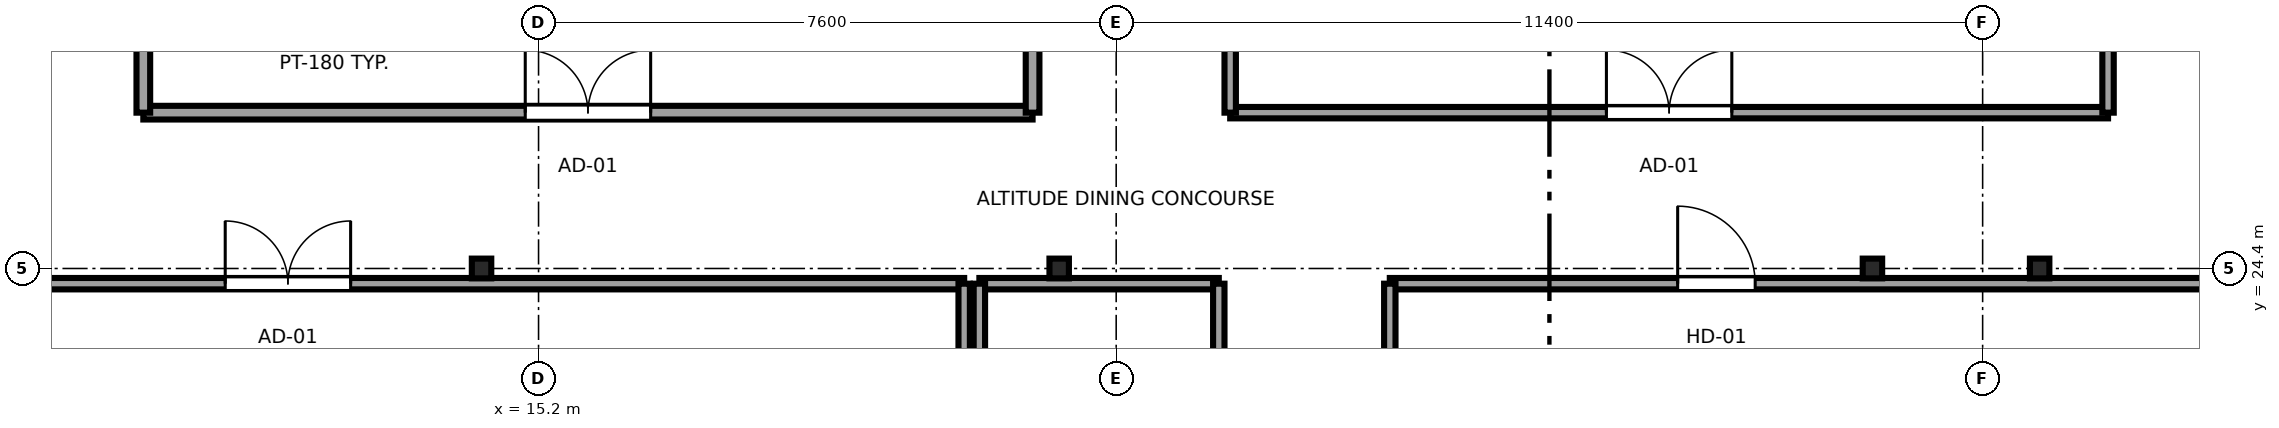
"""IFC4 building model, lengths in metres.
Left out: names, types, materials, properties, quantities, classifications, styles, units other than length and angle.
Written with IfcOpenShell. Run it as: python <this file> out.ifc"""

import sys

from ifc_helpers import new_model, si_unit, direction, frame, frame_2d, origin, origin_2d, place, context, subcontext, project, spatial, rectangle, i_section, extrude, source, transform, mapped, element, fill, save


model = new_model("IFC4")
c1 = context("Model", 3, precision=1e-05, world=origin(), true_north=direction((0.0, 1.0)))
c2 = subcontext(c1, "Body", "Model", "MODEL_VIEW")
j1 = project(units=[si_unit("LENGTHUNIT", "METRE"), si_unit("PLANEANGLEUNIT", "RADIAN")], contexts=[c1])
p1 = place(None, origin())
s1 = spatial("IfcSite", under=j1, at=p1, CompositionType="ELEMENT")
p2 = place(p1, origin())
s2 = spatial("IfcBuilding", under=s1, at=p2, CompositionType="ELEMENT")
p3 = place(p2, frame((0.0, 0.0, 286.55)))
s3 = spatial("IfcBuildingStorey", under=s2, at=p3, CompositionType="ELEMENT", Elevation=286.55)
m1 = source(origin(), c2, "Body", "SweptSolid", [
    extrude(i_section(OverallWidth=0.256, OverallDepth=0.26, WebThickness=0.01, FlangeThickness=0.017, FilletRadius=0.014, at=origin_2d()), origin(), (0.0, 0.0, 1.0), 4.4),
])
for number, where, z_axis, x_axis in (
    (1, (14.45, 24.4, 0.0), (0.0, 0.0, 1.0), (1.0, 0.0, 0.0)),
    (2, (22.05, 24.4, 0.0), (0.0, 0.0, 1.0), (1.0, 0.0, 0.0)),
    (3, (32.75, 24.4, 0.0), (0.0, 0.0, 1.0), (1.0, 0.0, 0.0)),
    (4, (34.95, 24.4, 0.0), (0.0, 0.0, 1.0), (1.0, 0.0, 0.0)),
):
    element("IfcColumn", number, at=place(p3, frame(where, z_axis=z_axis, x_axis=x_axis)), inside=s3, PredefinedType="COLUMN", context=c2, shape_type="MappedRepresentation", body=[
        mapped(m1, transform((0.0, 0.0, 0.0), x_axis=(1.0, 0.0, 0.0), y_axis=(0.0, 1.0, 0.0), z_axis=(0.0, 0.0, 1.0), scale=1.0)),
    ])
p4 = place(p3, frame((10.0, 26.45, 0.0), z_axis=(0.0, 0.0, 1.0), x_axis=(1.0, 0.0, 0.0)))
e5 = element("IfcWall", 5, at=p4, inside=s3, PredefinedType="PARTITIONING", context=c2, shape_type="SweptSolid", body=[
    extrude(rectangle(XDim=11.7, YDim=0.18, at=frame_2d((5.85, 0.0))), origin(), (0.0, 0.0, 1.0), 4.14),
])
p5 = place(p4, frame((5.025, 0.0, 0.0)))
e6 = element("IfcOpeningElement", 6, at=p5, cuts=e5, PredefinedType="OPENING", context=c2, shape_type="SweptSolid", body=[
    extrude(rectangle(XDim=1.65, YDim=2.15, at=frame_2d((0.825, 1.075))), frame((0.0, 0.1, 0.0), z_axis=(0.0, -1.0, 0.0), x_axis=(1.0, 0.0, 0.0)), (0.0, 0.0, 1.0), 0.2),
])
for number, where, z_axis, x_axis in (
    (7, (10.0, 26.45, 0.0), (0.0, 0.0, 1.0), (0.0, 1.0, 0.0)),
    (8, (21.7, 26.45, 0.0), (0.0, 0.0, 1.0), (0.0, 1.0, 0.0)),
):
    element("IfcWall", number, at=place(p3, frame(where, z_axis=z_axis, x_axis=x_axis)), inside=s3, PredefinedType="PARTITIONING", context=c2, shape_type="SweptSolid", body=[
        extrude(rectangle(XDim=2.7, YDim=0.18, at=frame_2d((1.35, 0.0))), origin(), (0.0, 0.0, 1.0), 4.14),
    ])
p6 = place(p3, frame((24.3, 26.45, 0.0), z_axis=(0.0, 0.0, 1.0), x_axis=(1.0, 0.0, 0.0)))
e9 = element("IfcWall", 9, at=p6, inside=s3, PredefinedType="PARTITIONING", context=c2, shape_type="SweptSolid", body=[
    extrude(rectangle(XDim=11.55, YDim=0.15, at=frame_2d((5.775, 0.0))), origin(), (0.0, 0.0, 1.0), 4.14),
])
p7 = place(p6, frame((4.95, 0.0, 0.0)))
e10 = element("IfcOpeningElement", 10, at=p7, cuts=e9, PredefinedType="OPENING", context=c2, shape_type="SweptSolid", body=[
    extrude(rectangle(XDim=1.65, YDim=2.15, at=frame_2d((0.825, 1.075))), frame((0.0, 0.085, 0.0), z_axis=(0.0, -1.0, 0.0), x_axis=(1.0, 0.0, 0.0)), (0.0, 0.0, 1.0), 0.17),
])
for number, where, z_axis, x_axis in (
    (11, (24.3, 26.45, 0.0), (0.0, 0.0, 1.0), (0.0, 1.0, 0.0)),
    (12, (35.85, 26.45, 0.0), (0.0, 0.0, 1.0), (0.0, 1.0, 0.0)),
):
    element("IfcWall", number, at=place(p3, frame(where, z_axis=z_axis, x_axis=x_axis)), inside=s3, PredefinedType="PARTITIONING", context=c2, shape_type="SweptSolid", body=[
        extrude(rectangle(XDim=2.7, YDim=0.15, at=frame_2d((1.35, 0.0))), origin(), (0.0, 0.0, 1.0), 4.14),
    ])
p8 = place(p3, frame((3.005, 24.2, 0.0), z_axis=(0.0, 0.0, 1.0), x_axis=(1.0, 0.0, 0.0)))
e13 = element("IfcWall", 13, at=p8, inside=s3, PredefinedType="PARTITIONING", context=c2, shape_type="SweptSolid", body=[
    extrude(rectangle(XDim=17.795, YDim=0.15, at=frame_2d((8.897, 0.0))), origin(), (0.0, 0.0, 1.0), 2.93),
])
p9 = place(p8, frame((8.073, 0.0, 0.0)))
e14 = element("IfcOpeningElement", 14, at=p9, cuts=e13, PredefinedType="OPENING", context=c2, shape_type="SweptSolid", body=[
    extrude(rectangle(XDim=1.65, YDim=2.15, at=frame_2d((0.825, 1.075))), frame((0.0, 0.085, 0.0), z_axis=(0.0, -1.0, 0.0), x_axis=(1.0, 0.0, 0.0)), (0.0, 0.0, 1.0), 0.17),
])
p10 = place(p3, frame((20.8, 5.605, 0.0), z_axis=(0.0, 0.0, 1.0), x_axis=(0.0, 1.0, 0.0)))
e15 = element("IfcWall", 15, at=p10, inside=s3, PredefinedType="PARTITIONING", context=c2, shape_type="SweptSolid", body=[
    extrude(rectangle(XDim=18.595, YDim=0.15, at=frame_2d((9.297, 0.0))), origin(), (0.0, 0.0, 1.0), 4.14),
])
p11 = place(p3, frame((26.4, 24.2, 0.0), z_axis=(0.0, 0.0, 1.0), x_axis=(1.0, 0.0, 0.0)))
e16 = element("IfcWall", 16, at=p11, inside=s3, PredefinedType="PARTITIONING", context=c2, shape_type="SweptSolid", body=[
    extrude(rectangle(XDim=12.195, YDim=0.15, at=frame_2d((6.098, 0.0))), origin(), (0.0, 0.0, 1.0), 2.93),
])
p12 = place(p11, frame((3.788, 0.0, 0.0)))
e17 = element("IfcOpeningElement", 17, at=p12, cuts=e16, PredefinedType="OPENING", context=c2, shape_type="SweptSolid", body=[
    extrude(rectangle(XDim=1.02, YDim=2.03, at=frame_2d((0.51, 1.015))), frame((0.0, 0.085, 0.0), z_axis=(0.0, -1.0, 0.0), x_axis=(1.0, 0.0, 0.0)), (0.0, 0.0, 1.0), 0.17),
])
p13 = place(p3, frame((26.4, 16.6, 0.0), z_axis=(0.0, 0.0, 1.0), x_axis=(0.0, 1.0, 0.0)))
e18 = element("IfcWall", 18, at=p13, inside=s3, PredefinedType="PARTITIONING", context=c2, shape_type="SweptSolid", body=[
    extrude(rectangle(XDim=7.6, YDim=0.15, at=frame_2d((3.8, 0.0))), origin(), (0.0, 0.0, 1.0), 4.14),
])
p14 = place(p3, frame((21.0, 24.2, 0.0), z_axis=(0.0, 0.0, 1.0), x_axis=(1.0, 0.0, 0.0)))
e19 = element("IfcWall", 19, at=p14, inside=s3, PredefinedType="PARTITIONING", context=c2, shape_type="SweptSolid", body=[
    extrude(rectangle(XDim=3.15, YDim=0.15, at=frame_2d((1.575, 0.0))), origin(), (0.0, 0.0, 1.0), 2.93),
])
p15 = place(p3, frame((21.0, 16.6, 0.0), z_axis=(0.0, 0.0, 1.0), x_axis=(0.0, 1.0, 0.0)))
e20 = element("IfcWall", 20, at=p15, inside=s3, PredefinedType="PARTITIONING", context=c2, shape_type="SweptSolid", body=[
    extrude(rectangle(XDim=7.6, YDim=0.15, at=frame_2d((3.8, 0.0))), origin(), (0.0, 0.0, 1.0), 4.14),
])
p16 = place(p3, frame((24.15, 16.6, 0.0), z_axis=(0.0, 0.0, 1.0), x_axis=(0.0, 1.0, 0.0)))
e21 = element("IfcWall", 21, at=p16, inside=s3, PredefinedType="PARTITIONING", context=c2, shape_type="SweptSolid", body=[
    extrude(rectangle(XDim=7.6, YDim=0.15, at=frame_2d((3.8, 0.0))), origin(), (0.0, 0.0, 1.0), 4.14),
])
p17 = place(p16, frame((3.29, 0.0, 0.0)))
e22 = element("IfcOpeningElement", 22, at=p17, cuts=e21, PredefinedType="OPENING", context=c2, shape_type="SweptSolid", body=[
    extrude(rectangle(XDim=1.02, YDim=2.03, at=frame_2d((0.51, 1.015))), frame((0.0, 0.085, 0.0), z_axis=(0.0, -1.0, 0.0), x_axis=(1.0, 0.0, 0.0)), (0.0, 0.0, 1.0), 0.17),
])
m2 = source(origin(), c2, "Body", "SweptSolid", [
    extrude(rectangle(XDim=1.65, YDim=2.15, at=frame_2d((0.825, 1.075))), frame((0.0, 0.025, 0.0), z_axis=(0.0, -1.0, 0.0), x_axis=(1.0, 0.0, 0.0)), (0.0, 0.0, 1.0), 0.05),
])
p18 = place(p5, origin())
e23 = element("IfcDoor", 23, at=p18, inside=s3, OperationType="DOUBLE_DOOR_SINGLE_SWING", PredefinedType="DOOR", context=c2, shape_type="MappedRepresentation", body=[
    mapped(m2, transform((0.0, 0.0, 0.0), x_axis=(1.0, 0.0, 0.0), y_axis=(0.0, 1.0, 0.0), z_axis=(0.0, 0.0, 1.0), scale=1.0)),
])
fill(e6, e23)
p19 = place(p7, origin())
e24 = element("IfcDoor", 24, at=p19, inside=s3, OperationType="DOUBLE_DOOR_SINGLE_SWING", PredefinedType="DOOR", context=c2, shape_type="MappedRepresentation", body=[
    mapped(m2, transform((0.0, 0.0, 0.0), x_axis=(1.0, 0.0, 0.0), y_axis=(0.0, 1.0, 0.0), z_axis=(0.0, 0.0, 1.0), scale=1.0)),
])
fill(e10, e24)
p20 = place(p9, origin())
e25 = element("IfcDoor", 25, at=p20, inside=s3, OperationType="DOUBLE_DOOR_SINGLE_SWING", PredefinedType="DOOR", context=c2, shape_type="MappedRepresentation", body=[
    mapped(m2, transform((0.0, 0.0, 0.0), x_axis=(1.0, 0.0, 0.0), y_axis=(0.0, 1.0, 0.0), z_axis=(0.0, 0.0, 1.0), scale=1.0)),
])
fill(e14, e25)
m3 = source(origin(), c2, "Body", "SweptSolid", [
    extrude(rectangle(XDim=1.02, YDim=2.03, at=frame_2d((0.51, 1.015))), frame((0.0, 0.025, 0.0), z_axis=(0.0, -1.0, 0.0), x_axis=(1.0, 0.0, 0.0)), (0.0, 0.0, 1.0), 0.05),
])
p21 = place(p12, origin())
e26 = element("IfcDoor", 26, at=p21, inside=s3, OperationType="SINGLE_SWING_LEFT", PredefinedType="DOOR", context=c2, shape_type="MappedRepresentation", body=[
    mapped(m3, transform((0.0, 0.0, 0.0), x_axis=(1.0, 0.0, 0.0), y_axis=(0.0, 1.0, 0.0), z_axis=(0.0, 0.0, 1.0), scale=1.0)),
])
fill(e17, e26)
save(model, sys.argv[1])
